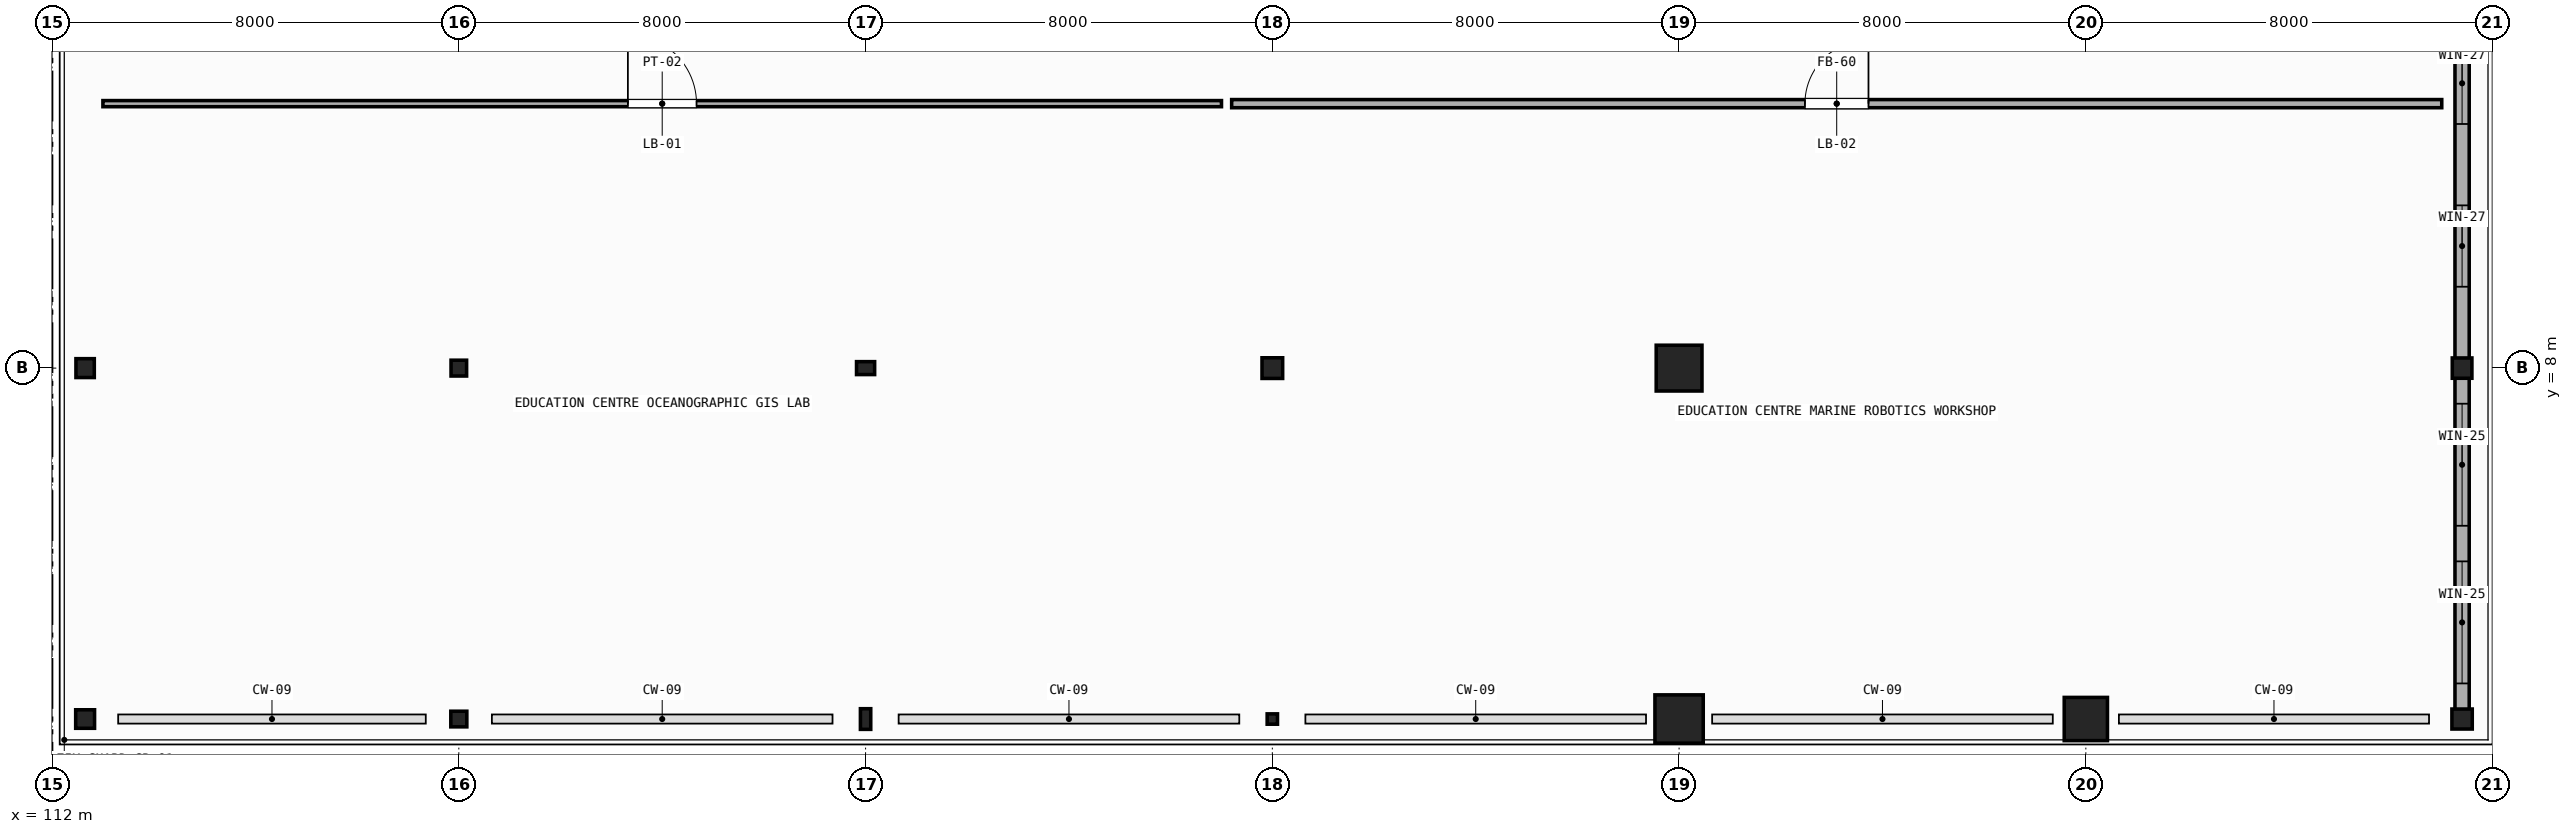
"""IFC4 building model, lengths in metres.
Left out: names, types, materials, properties, quantities, classifications, styles, units other than length and angle.
Written with IfcOpenShell. Run it as: python <this file> out.ifc"""

import sys

from ifc_helpers import new_model, si_unit, direction, frame, frame_2d, origin, origin_2d, place, context, subcontext, project, spatial, rectangle, hollow_rectangle, circle, hollow_circle, i_section, extrude, element, fill, save


model = new_model("IFC4")
c1 = context("Model", 3, precision=1e-05, world=origin(), true_north=direction((0.0, 1.0)))
c2 = subcontext(c1, "Body", "Model", "MODEL_VIEW")
j1 = project(units=[si_unit("LENGTHUNIT", "METRE"), si_unit("PLANEANGLEUNIT", "RADIAN")], contexts=[c1])
p1 = place(None, origin())
s1 = spatial("IfcSite", under=j1, at=p1, CompositionType="ELEMENT")
p2 = place(p1, origin())
s2 = spatial("IfcBuilding", under=s1, at=p2, CompositionType="ELEMENT")
p3 = place(p2, frame((0.0, 0.0, 10.2)))
s3 = spatial("IfcBuildingStorey", under=s2, at=p3, CompositionType="ELEMENT", Elevation=10.2)
p4 = place(p3, frame((112.65, 1.1, 0.0), z_axis=(0.0, 0.0, 1.0), x_axis=(1.0, 0.0, 0.0)))
e1 = element("IfcColumn", 1, at=p4, inside=s3, PredefinedType="COLUMN", context=c2, shape_type="SweptSolid", body=[
    extrude(i_section(OverallWidth=0.371, OverallDepth=0.364, WebThickness=0.013, FlangeThickness=0.022, FilletRadius=0.015, at=origin_2d()), origin(), (0.0, 0.0, 1.0), 4.8),
])
p5 = place(p3, frame((112.65, 8.0, 0.0), z_axis=(0.0, 0.0, 1.0), x_axis=(0.0, 1.0, 0.0)))
e2 = element("IfcColumn", 2, at=p5, inside=s3, PredefinedType="COLUMN", context=c2, shape_type="SweptSolid", body=[
    extrude(i_section(OverallWidth=0.371, OverallDepth=0.361, WebThickness=0.012, FlangeThickness=0.02, FilletRadius=0.015, at=origin_2d()), origin(), (0.0, 0.0, 1.0), 4.8),
])
p6 = place(p3, frame((120.0, 1.1, 0.0), z_axis=(0.0, 0.0, 1.0), x_axis=(0.0, 1.0, 0.0)))
e3 = element("IfcColumn", 3, at=p6, inside=s3, PredefinedType="COLUMN", context=c2, shape_type="SweptSolid", body=[
    extrude(i_section(OverallWidth=0.307, OverallDepth=0.315, WebThickness=0.012, FlangeThickness=0.019, FilletRadius=0.013, at=origin_2d()), origin(), (0.0, 0.0, 1.0), 4.58),
])
p7 = place(p3, frame((120.0, 8.0, 0.0), z_axis=(0.0, 0.0, 1.0), x_axis=(1.0, 0.0, 0.0)))
e4 = element("IfcColumn", 4, at=p7, inside=s3, PredefinedType="COLUMN", context=c2, shape_type="SweptSolid", body=[
    extrude(i_section(OverallWidth=0.306, OverallDepth=0.311, WebThickness=0.011, FlangeThickness=0.017, FilletRadius=0.013, at=origin_2d()), origin(), (0.0, 0.0, 1.0), 4.58),
])
p8 = place(p3, frame((128.0, 1.1, 0.0), z_axis=(0.0, 0.0, 1.0), x_axis=(1.0, 0.0, 0.0)))
e5 = element("IfcColumn", 5, at=p8, inside=s3, PredefinedType="COLUMN", context=c2, shape_type="SweptSolid", body=[
    extrude(hollow_rectangle(XDim=0.203, YDim=0.406, WallThickness=0.012, InnerFilletRadius=0.012, OuterFilletRadius=0.024, at=origin_2d()), origin(), (0.0, 0.0, 1.0), 4.58),
])
p9 = place(p3, frame((128.0, 8.0, 0.0), z_axis=(0.0, 0.0, 1.0), x_axis=(0.0, 1.0, 0.0)))
e6 = element("IfcColumn", 6, at=p9, inside=s3, PredefinedType="COLUMN", context=c2, shape_type="SweptSolid", body=[
    extrude(hollow_rectangle(XDim=0.254, YDim=0.356, WallThickness=0.012, InnerFilletRadius=0.012, OuterFilletRadius=0.024, at=origin_2d()), origin(), (0.0, 0.0, 1.0), 4.58),
])
p10 = place(p3, frame((136.0, 1.1, 0.0), z_axis=(0.0, 0.0, 1.0), x_axis=(0.0, 1.0, 0.0)))
e7 = element("IfcColumn", 7, at=p10, inside=s3, PredefinedType="COLUMN", context=c2, shape_type="SweptSolid", body=[
    extrude(hollow_rectangle(XDim=0.203, YDim=0.203, WallThickness=0.009, InnerFilletRadius=0.009, OuterFilletRadius=0.018, at=origin_2d()), origin(), (0.0, 0.0, 1.0), 4.58),
])
p11 = place(p3, frame((136.0, 8.0, 0.0), z_axis=(0.0, 0.0, 1.0), x_axis=(1.0, 0.0, 0.0)))
e8 = element("IfcColumn", 8, at=p11, inside=s3, PredefinedType="COLUMN", context=c2, shape_type="SweptSolid", body=[
    extrude(hollow_circle(Radius=0.203, WallThickness=0.012, at=origin_2d()), origin(), (0.0, 0.0, 1.0), 4.58),
])
p12 = place(p3, frame((144.0, 1.1, 0.0), z_axis=(0.0, 0.0, 1.0), x_axis=(1.0, 0.0, 0.0)))
e9 = element("IfcColumn", 9, at=p12, inside=s3, PredefinedType="COLUMN", context=c2, shape_type="SweptSolid", body=[
    extrude(rectangle(XDim=0.95, YDim=0.95, at=origin_2d()), origin(), (0.0, 0.0, 1.0), 4.58),
])
p13 = place(p3, frame((144.0, 8.0, 0.0), z_axis=(0.0, 0.0, 1.0), x_axis=(0.0, 1.0, 0.0)))
e10 = element("IfcColumn", 10, at=p13, inside=s3, PredefinedType="COLUMN", context=c2, shape_type="SweptSolid", body=[
    extrude(rectangle(XDim=0.9, YDim=0.9, at=origin_2d()), origin(), (0.0, 0.0, 1.0), 4.58),
])
p14 = place(p3, frame((152.0, 1.1, 0.0), z_axis=(0.0, 0.0, 1.0), x_axis=(0.0, 1.0, 0.0)))
e11 = element("IfcColumn", 11, at=p14, inside=s3, PredefinedType="COLUMN", context=c2, shape_type="SweptSolid", body=[
    extrude(circle(Radius=0.425, at=origin_2d()), origin(), (0.0, 0.0, 1.0), 4.58),
])
p15 = place(p3, frame((159.4, 1.1, 0.0), z_axis=(0.0, 0.0, 1.0), x_axis=(1.0, 0.0, 0.0)))
e12 = element("IfcColumn", 12, at=p15, inside=s3, PredefinedType="COLUMN", context=c2, shape_type="SweptSolid", body=[
    extrude(i_section(OverallWidth=0.4, OverallDepth=0.393, WebThickness=0.023, FlangeThickness=0.037, FilletRadius=0.015, at=origin_2d()), origin(), (0.0, 0.0, 1.0), 4.58),
])
p16 = place(p3, frame((159.4, 8.0, 0.0), z_axis=(0.0, 0.0, 1.0), x_axis=(0.0, 1.0, 0.0)))
e13 = element("IfcColumn", 13, at=p16, inside=s3, PredefinedType="COLUMN", context=c2, shape_type="SweptSolid", body=[
    extrude(i_section(OverallWidth=0.399, OverallDepth=0.386, WebThickness=0.021, FlangeThickness=0.033, FilletRadius=0.015, at=origin_2d()), origin(), (0.0, 0.0, 1.0), 4.58),
])
p17 = place(p3, frame((159.4, 1.1, 0.0), z_axis=(0.0, 0.0, 1.0), x_axis=(0.0, 1.0, 0.0)))
e14 = element("IfcWall", 14, at=p17, inside=s3, PredefinedType="STANDARD", context=c2, shape_type="SweptSolid", body=[
    extrude(rectangle(XDim=6.9, YDim=0.28, at=frame_2d((3.45, 0.0))), origin(), (0.0, 0.0, 1.0), 3.74),
])
p18 = place(p17, frame((0.7, 0.0, 1.0)))
e15 = element("IfcOpeningElement", 15, at=p18, cuts=e14, PredefinedType="OPENING", context=c2, shape_type="SweptSolid", body=[
    extrude(rectangle(XDim=2.4, YDim=2.05, at=frame_2d((1.2, 1.025))), frame((0.0, 0.15, 0.0), z_axis=(0.0, -1.0, 0.0), x_axis=(1.0, 0.0, 0.0)), (0.0, 0.0, 1.0), 0.3),
])
p19 = place(p17, frame((3.8, 0.0, 1.0)))
e16 = element("IfcOpeningElement", 16, at=p19, cuts=e14, PredefinedType="OPENING", context=c2, shape_type="SweptSolid", body=[
    extrude(rectangle(XDim=2.4, YDim=2.05, at=frame_2d((1.2, 1.025))), frame((0.0, 0.15, 0.0), z_axis=(0.0, -1.0, 0.0), x_axis=(1.0, 0.0, 0.0)), (0.0, 0.0, 1.0), 0.3),
])
p20 = place(p3, frame((159.4, 8.0, 0.0), z_axis=(0.0, 0.0, 1.0), x_axis=(0.0, 1.0, 0.0)))
e17 = element("IfcWall", 17, at=p20, inside=s3, PredefinedType="STANDARD", context=c2, shape_type="SweptSolid", body=[
    extrude(rectangle(XDim=8.0, YDim=0.28, at=frame_2d((4.0, 0.0))), origin(), (0.0, 0.0, 1.0), 3.74),
])
p21 = place(p20, frame((1.6, 0.0, 1.05)))
e18 = element("IfcOpeningElement", 18, at=p21, cuts=e17, PredefinedType="OPENING", context=c2, shape_type="SweptSolid", body=[
    extrude(rectangle(XDim=1.6, YDim=1.75, at=frame_2d((0.8, 0.875))), frame((0.0, 0.15, 0.0), z_axis=(0.0, -1.0, 0.0), x_axis=(1.0, 0.0, 0.0)), (0.0, 0.0, 1.0), 0.3),
])
p22 = place(p20, frame((4.8, 0.0, 1.05)))
e19 = element("IfcOpeningElement", 19, at=p22, cuts=e17, PredefinedType="OPENING", context=c2, shape_type="SweptSolid", body=[
    extrude(rectangle(XDim=1.6, YDim=1.75, at=frame_2d((0.8, 0.875))), frame((0.0, 0.15, 0.0), z_axis=(0.0, -1.0, 0.0), x_axis=(1.0, 0.0, 0.0)), (0.0, 0.0, 1.0), 0.3),
])
p23 = place(p3, frame((113.0, 13.2, 0.0), z_axis=(0.0, 0.0, 1.0), x_axis=(1.0, 0.0, 0.0)))
e20 = element("IfcWall", 20, at=p23, inside=s3, PredefinedType="PARTITIONING", context=c2, shape_type="SweptSolid", body=[
    extrude(rectangle(XDim=22.0, YDim=0.12, at=frame_2d((11.0, 0.0))), origin(), (0.0, 0.0, 1.0), 3.778),
])
p24 = place(p23, frame((10.325, 0.0, 0.0)))
e21 = element("IfcOpeningElement", 21, at=p24, cuts=e20, PredefinedType="OPENING", context=c2, shape_type="SweptSolid", body=[
    extrude(rectangle(XDim=1.35, YDim=2.25, at=frame_2d((0.675, 1.125))), frame((0.0, 0.07, 0.0), z_axis=(0.0, -1.0, 0.0), x_axis=(1.0, 0.0, 0.0)), (0.0, 0.0, 1.0), 0.14),
])
p25 = place(p3, frame((135.2, 13.2, 0.0), z_axis=(0.0, 0.0, 1.0), x_axis=(1.0, 0.0, 0.0)))
e22 = element("IfcWall", 22, at=p25, inside=s3, PredefinedType="PARTITIONING", context=c2, shape_type="SweptSolid", body=[
    extrude(rectangle(XDim=23.8, YDim=0.16, at=frame_2d((11.9, 0.0))), origin(), (0.0, 0.0, 1.0), 3.787),
])
p26 = place(p25, frame((11.275, 0.0, 0.0)))
e23 = element("IfcOpeningElement", 23, at=p26, cuts=e22, PredefinedType="OPENING", context=c2, shape_type="SweptSolid", body=[
    extrude(rectangle(XDim=1.25, YDim=2.2, at=frame_2d((0.625, 1.1))), frame((0.0, 0.09, 0.0), z_axis=(0.0, -1.0, 0.0), x_axis=(1.0, 0.0, 0.0)), (0.0, 0.0, 1.0), 0.18),
])
p27 = place(p18, origin())
e24 = element("IfcWindow", 24, at=p27, inside=s3, PartitioningType="SINGLE_PANEL", PredefinedType="WINDOW", context=c2, shape_type="SweptSolid", body=[
    extrude(rectangle(XDim=2.4, YDim=2.05, at=frame_2d((1.2, 1.025))), frame((0.0, 0.03, 0.0), z_axis=(0.0, -1.0, 0.0), x_axis=(1.0, 0.0, 0.0)), (0.0, 0.0, 1.0), 0.06),
])
fill(e15, e24)
p28 = place(p19, origin())
e25 = element("IfcWindow", 25, at=p28, inside=s3, PartitioningType="SINGLE_PANEL", PredefinedType="WINDOW", context=c2, shape_type="SweptSolid", body=[
    extrude(rectangle(XDim=2.4, YDim=2.05, at=frame_2d((1.2, 1.025))), frame((0.0, 0.03, 0.0), z_axis=(0.0, -1.0, 0.0), x_axis=(1.0, 0.0, 0.0)), (0.0, 0.0, 1.0), 0.06),
])
fill(e16, e25)
p29 = place(p21, origin())
e26 = element("IfcWindow", 26, at=p29, inside=s3, PartitioningType="SINGLE_PANEL", PredefinedType="WINDOW", context=c2, shape_type="SweptSolid", body=[
    extrude(rectangle(XDim=1.6, YDim=1.75, at=frame_2d((0.8, 0.875))), frame((0.0, 0.03, 0.0), z_axis=(0.0, -1.0, 0.0), x_axis=(1.0, 0.0, 0.0)), (0.0, 0.0, 1.0), 0.06),
])
fill(e18, e26)
p30 = place(p22, origin())
e27 = element("IfcWindow", 27, at=p30, inside=s3, PartitioningType="SINGLE_PANEL", PredefinedType="WINDOW", context=c2, shape_type="SweptSolid", body=[
    extrude(rectangle(XDim=1.6, YDim=1.75, at=frame_2d((0.8, 0.875))), frame((0.0, 0.03, 0.0), z_axis=(0.0, -1.0, 0.0), x_axis=(1.0, 0.0, 0.0)), (0.0, 0.0, 1.0), 0.06),
])
fill(e19, e27)
p31 = place(p24, origin())
e28 = element("IfcDoor", 28, at=p31, inside=s3, OperationType="SINGLE_SWING_LEFT", PredefinedType="DOOR", context=c2, shape_type="SweptSolid", body=[
    extrude(rectangle(XDim=1.35, YDim=2.25, at=frame_2d((0.675, 1.125))), frame((0.0, 0.025, 0.0), z_axis=(0.0, -1.0, 0.0), x_axis=(1.0, 0.0, 0.0)), (0.0, 0.0, 1.0), 0.05),
])
fill(e21, e28)
p32 = place(p26, origin())
e29 = element("IfcDoor", 29, at=p32, inside=s3, OperationType="SINGLE_SWING_RIGHT", PredefinedType="DOOR", context=c2, shape_type="SweptSolid", body=[
    extrude(rectangle(XDim=1.25, YDim=2.2, at=frame_2d((0.625, 1.1))), frame((0.0, 0.025, 0.0), z_axis=(0.0, -1.0, 0.0), x_axis=(1.0, 0.0, 0.0)), (0.0, 0.0, 1.0), 0.05),
])
fill(e23, e29)
save(model, sys.argv[1])
